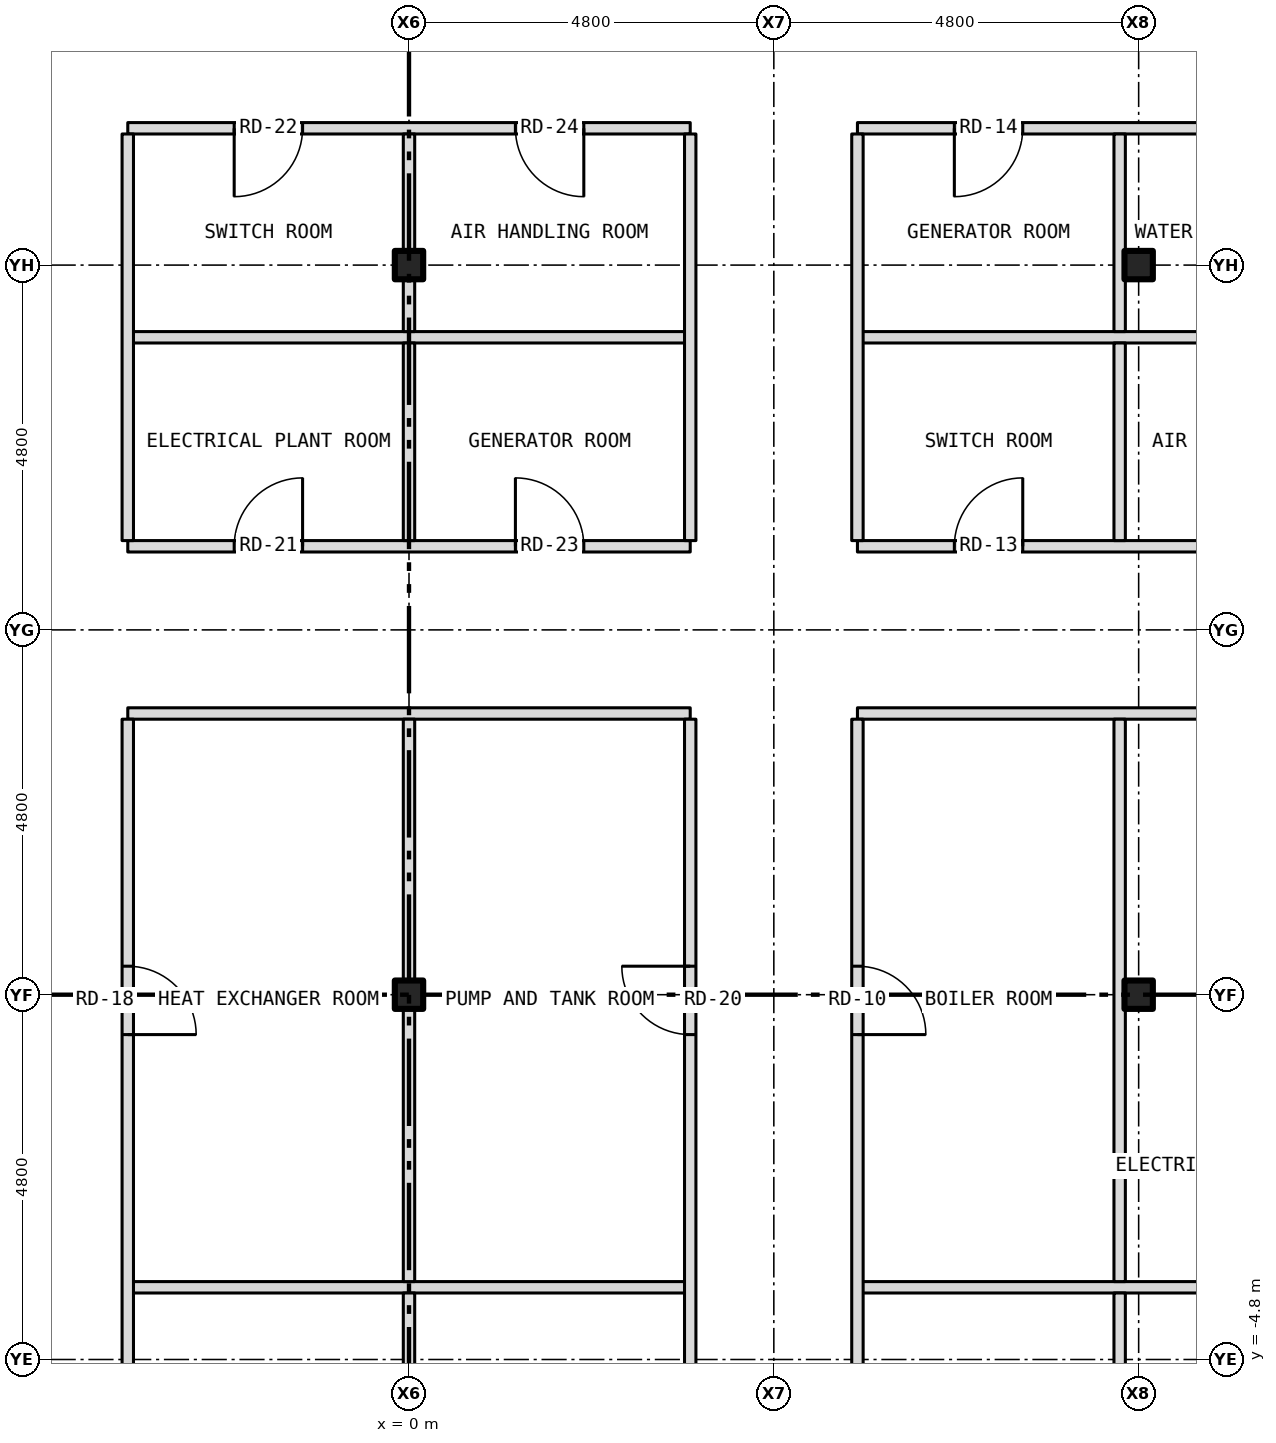
"""IFC4 building model, lengths in metres.
Left out: names, types, materials, properties, quantities, classifications, styles, units other than length and angle.
Written with IfcOpenShell. Run it as: python <this file> out.ifc"""

import sys

from ifc_helpers import new_model, si_unit, direction, frame, frame_2d, origin, origin_2d, place, context, subcontext, project, spatial, rectangle, i_section, extrude, element, fill, save


model = new_model("IFC4")
c1 = context("Model", 3, precision=1e-05, world=origin(), true_north=direction((0.0, 1.0)))
c2 = subcontext(c1, "Body", "Model", "MODEL_VIEW")
j1 = project(units=[si_unit("LENGTHUNIT", "METRE"), si_unit("PLANEANGLEUNIT", "RADIAN")], contexts=[c1])
p1 = place(None, origin())
s1 = spatial("IfcSite", under=j1, at=p1, CompositionType="ELEMENT")
p2 = place(p1, origin())
s2 = spatial("IfcBuilding", under=s1, at=p2, CompositionType="ELEMENT")
p3 = place(p2, frame((0.0, 0.0, 186.5)))
s3 = spatial("IfcBuildingStorey", under=s2, at=p3, CompositionType="ELEMENT", Elevation=186.5)
for number, where, z_axis, x_axis in (
    (1, (0.0, 0.0, -0.3), (0.0, 0.0, 1.0), (1.0, 0.0, 0.0)),
    (2, (0.0, 9.6, -0.3), (0.0, 0.0, 1.0), (1.0, 0.0, 0.0)),
    (3, (9.6, 0.0, -0.3), (0.0, 0.0, 1.0), (1.0, 0.0, 0.0)),
    (4, (9.6, 9.6, -0.3), (0.0, 0.0, 1.0), (1.0, 0.0, 0.0)),
):
    element("IfcColumn", number, at=place(p3, frame(where, z_axis=z_axis, x_axis=x_axis)), inside=s3, PredefinedType="COLUMN", context=c2, shape_type="SweptSolid", body=[
        extrude(i_section(OverallWidth=0.373, OverallDepth=0.373, WebThickness=0.016, FlangeThickness=0.026, at=origin_2d()), origin(), (0.0, 0.0, 1.0), 4.65),
    ])
p4 = place(p3, frame((-3.7, -3.85, 0.0), z_axis=(0.0, 0.0, 1.0), x_axis=(1.0, 0.0, 0.0)))
e5 = element("IfcWall", 5, at=p4, inside=s3, PredefinedType="PARTITIONING", context=c2, shape_type="SweptSolid", body=[
    extrude(rectangle(XDim=7.4, YDim=0.15, at=frame_2d((3.7, 0.0))), origin(), (0.0, 0.0, 1.0), 4.35),
])
p5 = place(p3, frame((5.9, -3.85, 0.0), z_axis=(0.0, 0.0, 1.0), x_axis=(1.0, 0.0, 0.0)))
e6 = element("IfcWall", 6, at=p5, inside=s3, PredefinedType="PARTITIONING", context=c2, shape_type="SweptSolid", body=[
    extrude(rectangle(XDim=6.9, YDim=0.15, at=frame_2d((3.45, 0.0))), origin(), (0.0, 0.0, 1.0), 4.35),
])
p6 = place(p3, frame((-3.7, 3.7, 0.0), z_axis=(0.0, 0.0, 1.0), x_axis=(1.0, 0.0, 0.0)))
e7 = element("IfcWall", 7, at=p6, inside=s3, PredefinedType="PARTITIONING", context=c2, shape_type="SweptSolid", body=[
    extrude(rectangle(XDim=7.4, YDim=0.15, at=frame_2d((3.7, 0.0))), origin(), (0.0, 0.0, 1.0), 4.35),
])
p7 = place(p3, frame((5.9, 3.7, 0.0), z_axis=(0.0, 0.0, 1.0), x_axis=(1.0, 0.0, 0.0)))
e8 = element("IfcWall", 8, at=p7, inside=s3, PredefinedType="PARTITIONING", context=c2, shape_type="SweptSolid", body=[
    extrude(rectangle(XDim=6.9, YDim=0.15, at=frame_2d((3.45, 0.0))), origin(), (0.0, 0.0, 1.0), 4.35),
])
p8 = place(p7, frame((4.725, 0.0, 0.0)))
e9 = element("IfcOpeningElement", 9, at=p8, cuts=e8, PredefinedType="OPENING", context=c2, shape_type="SweptSolid", body=[
    extrude(rectangle(XDim=0.9, YDim=2.1, at=frame_2d((0.45, 1.05))), frame((0.0, 0.087, 0.0), z_axis=(0.0, -1.0, 0.0), x_axis=(1.0, 0.0, 0.0)), (0.0, 0.0, 1.0), 0.174),
])
p9 = place(p3, frame((-3.7, 5.9, 0.0), z_axis=(0.0, 0.0, 1.0), x_axis=(1.0, 0.0, 0.0)))
e10 = element("IfcWall", 10, at=p9, inside=s3, PredefinedType="PARTITIONING", context=c2, shape_type="SweptSolid", body=[
    extrude(rectangle(XDim=7.4, YDim=0.15, at=frame_2d((3.7, 0.0))), origin(), (0.0, 0.0, 1.0), 4.35),
])
p10 = place(p9, frame((1.4, 0.0, 0.0)))
e11 = element("IfcOpeningElement", 11, at=p10, cuts=e10, PredefinedType="OPENING", context=c2, shape_type="SweptSolid", body=[
    extrude(rectangle(XDim=0.9, YDim=2.1, at=frame_2d((0.45, 1.05))), frame((0.0, 0.087, 0.0), z_axis=(0.0, -1.0, 0.0), x_axis=(1.0, 0.0, 0.0)), (0.0, 0.0, 1.0), 0.174),
])
p11 = place(p9, frame((5.1, 0.0, 0.0)))
e12 = element("IfcOpeningElement", 12, at=p11, cuts=e10, PredefinedType="OPENING", context=c2, shape_type="SweptSolid", body=[
    extrude(rectangle(XDim=0.9, YDim=2.1, at=frame_2d((0.45, 1.05))), frame((0.0, 0.087, 0.0), z_axis=(0.0, -1.0, 0.0), x_axis=(1.0, 0.0, 0.0)), (0.0, 0.0, 1.0), 0.174),
])
p12 = place(p3, frame((5.9, 5.9, 0.0), z_axis=(0.0, 0.0, 1.0), x_axis=(1.0, 0.0, 0.0)))
e13 = element("IfcWall", 13, at=p12, inside=s3, PredefinedType="PARTITIONING", context=c2, shape_type="SweptSolid", body=[
    extrude(rectangle(XDim=6.9, YDim=0.15, at=frame_2d((3.45, 0.0))), origin(), (0.0, 0.0, 1.0), 4.35),
])
p13 = place(p12, frame((1.275, 0.0, 0.0)))
e14 = element("IfcOpeningElement", 14, at=p13, cuts=e13, PredefinedType="OPENING", context=c2, shape_type="SweptSolid", body=[
    extrude(rectangle(XDim=0.9, YDim=2.1, at=frame_2d((0.45, 1.05))), frame((0.0, 0.087, 0.0), z_axis=(0.0, -1.0, 0.0), x_axis=(1.0, 0.0, 0.0)), (0.0, 0.0, 1.0), 0.174),
])
p14 = place(p12, frame((4.725, 0.0, 0.0)))
e15 = element("IfcOpeningElement", 15, at=p14, cuts=e13, PredefinedType="OPENING", context=c2, shape_type="SweptSolid", body=[
    extrude(rectangle(XDim=0.9, YDim=2.1, at=frame_2d((0.45, 1.05))), frame((0.0, 0.087, 0.0), z_axis=(0.0, -1.0, 0.0), x_axis=(1.0, 0.0, 0.0)), (0.0, 0.0, 1.0), 0.174),
])
p15 = place(p3, frame((-3.7, 8.65, 0.0), z_axis=(0.0, 0.0, 1.0), x_axis=(1.0, 0.0, 0.0)))
e16 = element("IfcWall", 16, at=p15, inside=s3, PredefinedType="PARTITIONING", context=c2, shape_type="SweptSolid", body=[
    extrude(rectangle(XDim=7.4, YDim=0.15, at=frame_2d((3.7, 0.0))), origin(), (0.0, 0.0, 1.0), 4.35),
])
p16 = place(p3, frame((5.9, 8.65, 0.0), z_axis=(0.0, 0.0, 1.0), x_axis=(1.0, 0.0, 0.0)))
e17 = element("IfcWall", 17, at=p16, inside=s3, PredefinedType="PARTITIONING", context=c2, shape_type="SweptSolid", body=[
    extrude(rectangle(XDim=6.9, YDim=0.15, at=frame_2d((3.45, 0.0))), origin(), (0.0, 0.0, 1.0), 4.35),
])
p17 = place(p3, frame((-3.7, 11.4, 0.0), z_axis=(0.0, 0.0, 1.0), x_axis=(1.0, 0.0, 0.0)))
e18 = element("IfcWall", 18, at=p17, inside=s3, PredefinedType="PARTITIONING", context=c2, shape_type="SweptSolid", body=[
    extrude(rectangle(XDim=7.4, YDim=0.15, at=frame_2d((3.7, 0.0))), origin(), (0.0, 0.0, 1.0), 4.35),
])
p18 = place(p17, frame((1.4, 0.0, 0.0)))
e19 = element("IfcOpeningElement", 19, at=p18, cuts=e18, PredefinedType="OPENING", context=c2, shape_type="SweptSolid", body=[
    extrude(rectangle(XDim=0.9, YDim=2.1, at=frame_2d((0.45, 1.05))), frame((0.0, 0.087, 0.0), z_axis=(0.0, -1.0, 0.0), x_axis=(1.0, 0.0, 0.0)), (0.0, 0.0, 1.0), 0.174),
])
p19 = place(p17, frame((5.1, 0.0, 0.0)))
e20 = element("IfcOpeningElement", 20, at=p19, cuts=e18, PredefinedType="OPENING", context=c2, shape_type="SweptSolid", body=[
    extrude(rectangle(XDim=0.9, YDim=2.1, at=frame_2d((0.45, 1.05))), frame((0.0, 0.087, 0.0), z_axis=(0.0, -1.0, 0.0), x_axis=(1.0, 0.0, 0.0)), (0.0, 0.0, 1.0), 0.174),
])
p20 = place(p3, frame((5.9, 11.4, 0.0), z_axis=(0.0, 0.0, 1.0), x_axis=(1.0, 0.0, 0.0)))
e21 = element("IfcWall", 21, at=p20, inside=s3, PredefinedType="PARTITIONING", context=c2, shape_type="SweptSolid", body=[
    extrude(rectangle(XDim=6.9, YDim=0.15, at=frame_2d((3.45, 0.0))), origin(), (0.0, 0.0, 1.0), 4.35),
])
p21 = place(p20, frame((1.275, 0.0, 0.0)))
e22 = element("IfcOpeningElement", 22, at=p21, cuts=e21, PredefinedType="OPENING", context=c2, shape_type="SweptSolid", body=[
    extrude(rectangle(XDim=0.9, YDim=2.1, at=frame_2d((0.45, 1.05))), frame((0.0, 0.087, 0.0), z_axis=(0.0, -1.0, 0.0), x_axis=(1.0, 0.0, 0.0)), (0.0, 0.0, 1.0), 0.174),
])
p22 = place(p20, frame((4.725, 0.0, 0.0)))
e23 = element("IfcOpeningElement", 23, at=p22, cuts=e21, PredefinedType="OPENING", context=c2, shape_type="SweptSolid", body=[
    extrude(rectangle(XDim=0.9, YDim=2.1, at=frame_2d((0.45, 1.05))), frame((0.0, 0.087, 0.0), z_axis=(0.0, -1.0, 0.0), x_axis=(1.0, 0.0, 0.0)), (0.0, 0.0, 1.0), 0.174),
])
p23 = place(p3, frame((-3.7, -11.325, 0.0), z_axis=(0.0, 0.0, 1.0), x_axis=(0.0, 1.0, 0.0)))
e24 = element("IfcWall", 24, at=p23, inside=s3, PredefinedType="PARTITIONING", context=c2, shape_type="SweptSolid", body=[
    extrude(rectangle(XDim=14.95, YDim=0.15, at=frame_2d((7.475, 0.0))), origin(), (0.0, 0.0, 1.0), 4.35),
])
p24 = place(p23, frame((3.25, 0.0, 0.0)))
e25 = element("IfcOpeningElement", 25, at=p24, cuts=e24, PredefinedType="OPENING", context=c2, shape_type="SweptSolid", body=[
    extrude(rectangle(XDim=0.9, YDim=2.1, at=frame_2d((0.45, 1.05))), frame((0.0, 0.087, 0.0), z_axis=(0.0, -1.0, 0.0), x_axis=(1.0, 0.0, 0.0)), (0.0, 0.0, 1.0), 0.174),
])
p25 = place(p23, frame((10.8, 0.0, 0.0)))
e26 = element("IfcOpeningElement", 26, at=p25, cuts=e24, PredefinedType="OPENING", context=c2, shape_type="SweptSolid", body=[
    extrude(rectangle(XDim=0.9, YDim=2.1, at=frame_2d((0.45, 1.05))), frame((0.0, 0.087, 0.0), z_axis=(0.0, -1.0, 0.0), x_axis=(1.0, 0.0, 0.0)), (0.0, 0.0, 1.0), 0.174),
])
p26 = place(p3, frame((-3.7, 5.975, 0.0), z_axis=(0.0, 0.0, 1.0), x_axis=(0.0, 1.0, 0.0)))
e27 = element("IfcWall", 27, at=p26, inside=s3, PredefinedType="PARTITIONING", context=c2, shape_type="SweptSolid", body=[
    extrude(rectangle(XDim=5.35, YDim=0.15, at=frame_2d((2.675, 0.0))), origin(), (0.0, 0.0, 1.0), 4.35),
])
p27 = place(p3, frame((0.0, -9.413, 0.0), z_axis=(0.0, 0.0, 1.0), x_axis=(0.0, 1.0, 0.0)))
e28 = element("IfcWall", 28, at=p27, inside=s3, PredefinedType="PARTITIONING", context=c2, shape_type="SweptSolid", body=[
    extrude(rectangle(XDim=5.488, YDim=0.15, at=frame_2d((2.744, 0.0))), origin(), (0.0, 0.0, 1.0), 3.728),
])
p28 = place(p3, frame((0.0, -3.775, 0.0), z_axis=(0.0, 0.0, 1.0), x_axis=(0.0, 1.0, 0.0)))
e29 = element("IfcWall", 29, at=p28, inside=s3, PredefinedType="PARTITIONING", context=c2, shape_type="SweptSolid", body=[
    extrude(rectangle(XDim=3.588, YDim=0.15, at=frame_2d((1.794, 0.0))), origin(), (0.0, 0.0, 1.0), 3.728),
])
p29 = place(p3, frame((0.0, -0.187, 0.0), z_axis=(0.0, 0.0, 1.0), x_axis=(0.0, 1.0, 0.0)))
e30 = element("IfcWall", 30, at=p29, inside=s3, PredefinedType="PARTITIONING", context=c2, shape_type="SweptSolid", body=[
    extrude(rectangle(XDim=0.374, YDim=0.15, at=frame_2d((0.187, 0.0))), origin(), (0.0, 0.0, 1.0), 4.35),
])
p30 = place(p3, frame((0.0, 0.187, 0.0), z_axis=(0.0, 0.0, 1.0), x_axis=(0.0, 1.0, 0.0)))
e31 = element("IfcWall", 31, at=p30, inside=s3, PredefinedType="PARTITIONING", context=c2, shape_type="SweptSolid", body=[
    extrude(rectangle(XDim=3.438, YDim=0.15, at=frame_2d((1.719, 0.0))), origin(), (0.0, 0.0, 1.0), 3.728),
])
p31 = place(p3, frame((0.0, 5.975, 0.0), z_axis=(0.0, 0.0, 1.0), x_axis=(0.0, 1.0, 0.0)))
e32 = element("IfcWall", 32, at=p31, inside=s3, PredefinedType="PARTITIONING", context=c2, shape_type="SweptSolid", body=[
    extrude(rectangle(XDim=2.6, YDim=0.15, at=frame_2d((1.3, 0.0))), origin(), (0.0, 0.0, 1.0), 3.728),
])
p32 = place(p3, frame((0.0, 8.725, 0.0), z_axis=(0.0, 0.0, 1.0), x_axis=(0.0, 1.0, 0.0)))
e33 = element("IfcWall", 33, at=p32, inside=s3, PredefinedType="PARTITIONING", context=c2, shape_type="SweptSolid", body=[
    extrude(rectangle(XDim=0.688, YDim=0.15, at=frame_2d((0.344, 0.0))), origin(), (0.0, 0.0, 1.0), 3.728),
])
p33 = place(p3, frame((0.0, 9.413, 0.0), z_axis=(0.0, 0.0, 1.0), x_axis=(0.0, 1.0, 0.0)))
e34 = element("IfcWall", 34, at=p33, inside=s3, PredefinedType="PARTITIONING", context=c2, shape_type="SweptSolid", body=[
    extrude(rectangle(XDim=0.374, YDim=0.15, at=frame_2d((0.187, 0.0))), origin(), (0.0, 0.0, 1.0), 4.35),
])
p34 = place(p3, frame((0.0, 9.787, 0.0), z_axis=(0.0, 0.0, 1.0), x_axis=(0.0, 1.0, 0.0)))
e35 = element("IfcWall", 35, at=p34, inside=s3, PredefinedType="PARTITIONING", context=c2, shape_type="SweptSolid", body=[
    extrude(rectangle(XDim=1.538, YDim=0.15, at=frame_2d((0.769, 0.0))), origin(), (0.0, 0.0, 1.0), 3.728),
])
p35 = place(p3, frame((3.7, -11.325, 0.0), z_axis=(0.0, 0.0, 1.0), x_axis=(0.0, 1.0, 0.0)))
e36 = element("IfcWall", 36, at=p35, inside=s3, PredefinedType="PARTITIONING", context=c2, shape_type="SweptSolid", body=[
    extrude(rectangle(XDim=14.95, YDim=0.15, at=frame_2d((7.475, 0.0))), origin(), (0.0, 0.0, 1.0), 4.35),
])
p36 = place(p35, frame((3.25, 0.0, 0.0)))
e37 = element("IfcOpeningElement", 37, at=p36, cuts=e36, PredefinedType="OPENING", context=c2, shape_type="SweptSolid", body=[
    extrude(rectangle(XDim=0.9, YDim=2.1, at=frame_2d((0.45, 1.05))), frame((0.0, 0.087, 0.0), z_axis=(0.0, -1.0, 0.0), x_axis=(1.0, 0.0, 0.0)), (0.0, 0.0, 1.0), 0.174),
])
p37 = place(p35, frame((10.8, 0.0, 0.0)))
e38 = element("IfcOpeningElement", 38, at=p37, cuts=e36, PredefinedType="OPENING", context=c2, shape_type="SweptSolid", body=[
    extrude(rectangle(XDim=0.9, YDim=2.1, at=frame_2d((0.45, 1.05))), frame((0.0, 0.087, 0.0), z_axis=(0.0, -1.0, 0.0), x_axis=(1.0, 0.0, 0.0)), (0.0, 0.0, 1.0), 0.174),
])
p38 = place(p3, frame((3.7, 5.975, 0.0), z_axis=(0.0, 0.0, 1.0), x_axis=(0.0, 1.0, 0.0)))
e39 = element("IfcWall", 39, at=p38, inside=s3, PredefinedType="PARTITIONING", context=c2, shape_type="SweptSolid", body=[
    extrude(rectangle(XDim=5.35, YDim=0.15, at=frame_2d((2.675, 0.0))), origin(), (0.0, 0.0, 1.0), 4.35),
])
p39 = place(p3, frame((5.9, -11.325, 0.0), z_axis=(0.0, 0.0, 1.0), x_axis=(0.0, 1.0, 0.0)))
e40 = element("IfcWall", 40, at=p39, inside=s3, PredefinedType="PARTITIONING", context=c2, shape_type="SweptSolid", body=[
    extrude(rectangle(XDim=14.95, YDim=0.15, at=frame_2d((7.475, 0.0))), origin(), (0.0, 0.0, 1.0), 4.35),
])
p40 = place(p39, frame((3.25, 0.0, 0.0)))
e41 = element("IfcOpeningElement", 41, at=p40, cuts=e40, PredefinedType="OPENING", context=c2, shape_type="SweptSolid", body=[
    extrude(rectangle(XDim=0.9, YDim=2.1, at=frame_2d((0.45, 1.05))), frame((0.0, 0.087, 0.0), z_axis=(0.0, -1.0, 0.0), x_axis=(1.0, 0.0, 0.0)), (0.0, 0.0, 1.0), 0.174),
])
p41 = place(p39, frame((10.8, 0.0, 0.0)))
e42 = element("IfcOpeningElement", 42, at=p41, cuts=e40, PredefinedType="OPENING", context=c2, shape_type="SweptSolid", body=[
    extrude(rectangle(XDim=0.9, YDim=2.1, at=frame_2d((0.45, 1.05))), frame((0.0, 0.087, 0.0), z_axis=(0.0, -1.0, 0.0), x_axis=(1.0, 0.0, 0.0)), (0.0, 0.0, 1.0), 0.174),
])
p42 = place(p3, frame((5.9, 5.975, 0.0), z_axis=(0.0, 0.0, 1.0), x_axis=(0.0, 1.0, 0.0)))
e43 = element("IfcWall", 43, at=p42, inside=s3, PredefinedType="PARTITIONING", context=c2, shape_type="SweptSolid", body=[
    extrude(rectangle(XDim=5.35, YDim=0.15, at=frame_2d((2.675, 0.0))), origin(), (0.0, 0.0, 1.0), 4.35),
])
for number, where, z_axis, x_axis in (
    (44, (9.35, -11.325, 0.0), (0.0, 0.0, 1.0), (0.0, 1.0, 0.0)),
    (45, (9.35, -3.775, 0.0), (0.0, 0.0, 1.0), (0.0, 1.0, 0.0)),
):
    element("IfcWall", number, at=place(p3, frame(where, z_axis=z_axis, x_axis=x_axis)), inside=s3, PredefinedType="PARTITIONING", context=c2, shape_type="SweptSolid", body=[
        extrude(rectangle(XDim=7.4, YDim=0.15, at=frame_2d((3.7, 0.0))), origin(), (0.0, 0.0, 1.0), 4.35),
    ])
for number, where, z_axis, x_axis in (
    (46, (9.35, 5.975, 0.0), (0.0, 0.0, 1.0), (0.0, 1.0, 0.0)),
    (47, (9.35, 8.725, 0.0), (0.0, 0.0, 1.0), (0.0, 1.0, 0.0)),
):
    element("IfcWall", number, at=place(p3, frame(where, z_axis=z_axis, x_axis=x_axis)), inside=s3, PredefinedType="PARTITIONING", context=c2, shape_type="SweptSolid", body=[
        extrude(rectangle(XDim=2.6, YDim=0.15, at=frame_2d((1.3, 0.0))), origin(), (0.0, 0.0, 1.0), 4.35),
    ])
p43 = place(p41, origin())
e48 = element("IfcDoor", 48, at=p43, inside=s3, OperationType="SINGLE_SWING_LEFT", PredefinedType="DOOR", context=c2, shape_type="SweptSolid", body=[
    extrude(rectangle(XDim=0.9, YDim=2.1, at=frame_2d((0.45, 1.05))), frame((0.0, 0.025, 0.0), z_axis=(0.0, -1.0, 0.0), x_axis=(1.0, 0.0, 0.0)), (0.0, 0.0, 1.0), 0.05),
])
fill(e42, e48)
p44 = place(p13, origin())
e49 = element("IfcDoor", 49, at=p44, inside=s3, OperationType="SINGLE_SWING_RIGHT", PredefinedType="DOOR", context=c2, shape_type="SweptSolid", body=[
    extrude(rectangle(XDim=0.9, YDim=2.1, at=frame_2d((0.45, 1.05))), frame((0.0, 0.025, 0.0), z_axis=(0.0, -1.0, 0.0), x_axis=(1.0, 0.0, 0.0)), (0.0, 0.0, 1.0), 0.05),
])
fill(e14, e49)
p45 = place(p21, origin())
e50 = element("IfcDoor", 50, at=p45, inside=s3, OperationType="SINGLE_SWING_LEFT", PredefinedType="DOOR", context=c2, shape_type="SweptSolid", body=[
    extrude(rectangle(XDim=0.9, YDim=2.1, at=frame_2d((0.45, 1.05))), frame((0.0, 0.025, 0.0), z_axis=(0.0, -1.0, 0.0), x_axis=(1.0, 0.0, 0.0)), (0.0, 0.0, 1.0), 0.05),
])
fill(e22, e50)
p46 = place(p25, origin())
e51 = element("IfcDoor", 51, at=p46, inside=s3, OperationType="SINGLE_SWING_LEFT", PredefinedType="DOOR", context=c2, shape_type="SweptSolid", body=[
    extrude(rectangle(XDim=0.9, YDim=2.1, at=frame_2d((0.45, 1.05))), frame((0.0, 0.025, 0.0), z_axis=(0.0, -1.0, 0.0), x_axis=(1.0, 0.0, 0.0)), (0.0, 0.0, 1.0), 0.05),
])
fill(e26, e51)
p47 = place(p37, origin())
e52 = element("IfcDoor", 52, at=p47, inside=s3, OperationType="SINGLE_SWING_RIGHT", PredefinedType="DOOR", context=c2, shape_type="SweptSolid", body=[
    extrude(rectangle(XDim=0.9, YDim=2.1, at=frame_2d((0.45, 1.05))), frame((0.0, 0.025, 0.0), z_axis=(0.0, -1.0, 0.0), x_axis=(1.0, 0.0, 0.0)), (0.0, 0.0, 1.0), 0.05),
])
fill(e38, e52)
p48 = place(p10, origin())
e53 = element("IfcDoor", 53, at=p48, inside=s3, OperationType="SINGLE_SWING_RIGHT", PredefinedType="DOOR", context=c2, shape_type="SweptSolid", body=[
    extrude(rectangle(XDim=0.9, YDim=2.1, at=frame_2d((0.45, 1.05))), frame((0.0, 0.025, 0.0), z_axis=(0.0, -1.0, 0.0), x_axis=(1.0, 0.0, 0.0)), (0.0, 0.0, 1.0), 0.05),
])
fill(e11, e53)
p49 = place(p18, origin())
e54 = element("IfcDoor", 54, at=p49, inside=s3, OperationType="SINGLE_SWING_LEFT", PredefinedType="DOOR", context=c2, shape_type="SweptSolid", body=[
    extrude(rectangle(XDim=0.9, YDim=2.1, at=frame_2d((0.45, 1.05))), frame((0.0, 0.025, 0.0), z_axis=(0.0, -1.0, 0.0), x_axis=(1.0, 0.0, 0.0)), (0.0, 0.0, 1.0), 0.05),
])
fill(e19, e54)
p50 = place(p11, origin())
e55 = element("IfcDoor", 55, at=p50, inside=s3, OperationType="SINGLE_SWING_LEFT", PredefinedType="DOOR", context=c2, shape_type="SweptSolid", body=[
    extrude(rectangle(XDim=0.9, YDim=2.1, at=frame_2d((0.45, 1.05))), frame((0.0, 0.025, 0.0), z_axis=(0.0, -1.0, 0.0), x_axis=(1.0, 0.0, 0.0)), (0.0, 0.0, 1.0), 0.05),
])
fill(e12, e55)
p51 = place(p19, origin())
e56 = element("IfcDoor", 56, at=p51, inside=s3, OperationType="SINGLE_SWING_RIGHT", PredefinedType="DOOR", context=c2, shape_type="SweptSolid", body=[
    extrude(rectangle(XDim=0.9, YDim=2.1, at=frame_2d((0.45, 1.05))), frame((0.0, 0.025, 0.0), z_axis=(0.0, -1.0, 0.0), x_axis=(1.0, 0.0, 0.0)), (0.0, 0.0, 1.0), 0.05),
])
fill(e20, e56)
save(model, sys.argv[1])
